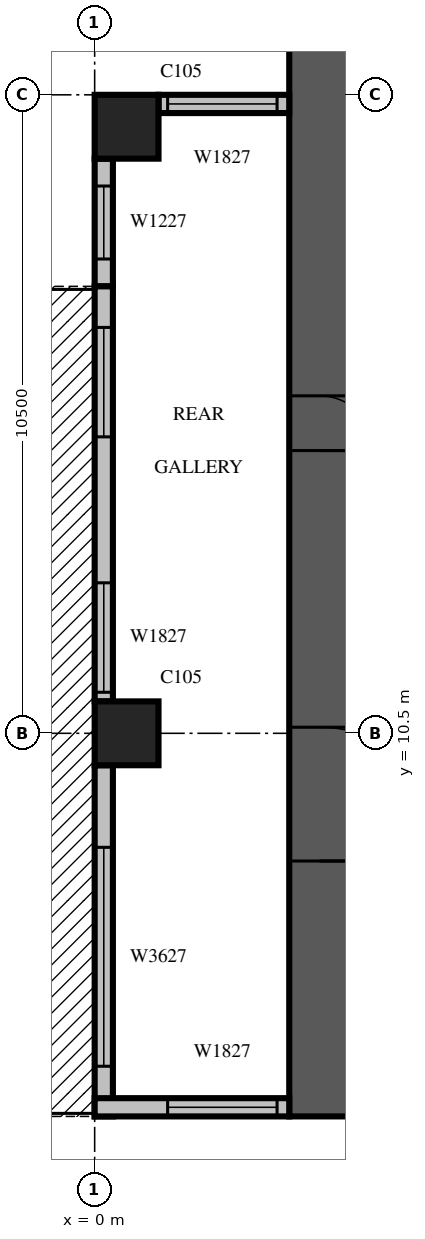
"""IFC4 building model, lengths in metres.
Left out: names, types, materials, properties, quantities, classifications, styles, units other than length and angle.
Written with IfcOpenShell. Run it as: python <this file> out.ifc"""

import sys

from ifc_helpers import new_model, si_unit, direction, frame, frame_2d, origin, origin_2d, place, context, subcontext, project, spatial, rectangle, extrude, source, transform, mapped, element, fill, save


model = new_model("IFC4")
c1 = context("Model", 3, precision=1e-05, world=origin(), true_north=direction((0.0, 1.0)))
c2 = subcontext(c1, "Body", "Model", "MODEL_VIEW")
j1 = project(units=[si_unit("LENGTHUNIT", "METRE"), si_unit("PLANEANGLEUNIT", "RADIAN")], contexts=[c1])
p1 = place(None, origin())
s1 = spatial("IfcSite", under=j1, at=p1, CompositionType="ELEMENT")
p2 = place(p1, origin())
s2 = spatial("IfcBuilding", under=s1, at=p2, CompositionType="ELEMENT")
p3 = place(p2, frame((0.0, 0.0, 145.5)))
s3 = spatial("IfcBuildingStorey", under=s2, at=p3, CompositionType="ELEMENT", Elevation=145.5)
m1 = source(origin(), c2, "Body", "SweptSolid", [
    extrude(rectangle(XDim=1.05, YDim=1.05, at=origin_2d()), origin(), (0.0, 0.0, 1.0), 4.2),
])
for number, where, z_axis, x_axis in (
    (1, (0.525, 10.5, 0.0), (0.0, 0.0, 1.0), (1.0, 0.0, 0.0)),
    (2, (0.525, 20.475, 0.0), (0.0, 0.0, 1.0), (1.0, 0.0, 0.0)),
):
    element("IfcColumn", number, at=place(p3, frame(where, z_axis=z_axis, x_axis=x_axis)), inside=s3, PredefinedType="COLUMN", context=c2, shape_type="MappedRepresentation", body=[
        mapped(m1, transform((0.0, 0.0, 0.0), scale=1.0)),
    ])
m2 = source(origin(), c2, "Body", "SweptSolid", [
    extrude(rectangle(XDim=17.8, YDim=1.0, at=frame_2d((8.9, 0.0))), origin(), (0.0, 0.0, 1.0), 4.2),
])
p4 = place(p3, frame((3.7, 4.2, 0.0), z_axis=(0.0, 0.0, 1.0), x_axis=(0.0, 1.0, 0.0)))
e3 = element("IfcWall", 3, at=p4, inside=s3, PredefinedType="SHEAR", context=c2, shape_type="MappedRepresentation", body=[
    mapped(m2, transform((0.0, 0.0, 0.0), scale=1.0)),
])
m3 = source(origin(), c2, "Body", "SweptSolid", [
    extrude(rectangle(XDim=2.2, YDim=2.1, at=frame_2d((1.1, 1.05))), frame((0.0, 0.51, 0.0), z_axis=(0.0, -1.0, 0.0), x_axis=(1.0, 0.0, 0.0)), (0.0, 0.0, 1.0), 1.02),
])
p5 = place(p4, frame((4.2, 0.0, 0.0)))
e4 = element("IfcOpeningElement", 4, at=p5, cuts=e3, PredefinedType="OPENING", context=c2, shape_type="MappedRepresentation", body=[
    mapped(m3, transform((0.0, 0.0, 0.0), scale=1.0)),
])
m4 = source(origin(), c2, "Body", "SweptSolid", [
    extrude(rectangle(XDim=0.9, YDim=2.1, at=frame_2d((0.45, 1.05))), frame((0.0, 0.51, 0.0), z_axis=(0.0, -1.0, 0.0), x_axis=(1.0, 0.0, 0.0)), (0.0, 0.0, 1.0), 1.02),
])
p6 = place(p4, frame((10.95, 0.0, 0.0)))
e5 = element("IfcOpeningElement", 5, at=p6, cuts=e3, PredefinedType="OPENING", context=c2, shape_type="MappedRepresentation", body=[
    mapped(m4, transform((0.0, 0.0, 0.0), scale=1.0)),
])
m5 = source(origin(), c2, "Body", "SweptSolid", [
    extrude(rectangle(XDim=2.15, YDim=0.3, at=frame_2d((1.075, 0.0))), origin(), (0.0, 0.0, 1.0), 3.8),
])
p7 = place(p3, frame((3.2, 20.85, 0.0), z_axis=(0.0, 0.0, 1.0), x_axis=(-1.0, 0.0, 0.0)))
e6 = element("IfcWall", 6, at=p7, inside=s3, PredefinedType="STANDARD", context=c2, shape_type="MappedRepresentation", body=[
    mapped(m5, transform((0.0, 0.0, 0.0), scale=1.0)),
])
m6 = source(origin(), c2, "Body", "SweptSolid", [
    extrude(rectangle(XDim=1.8, YDim=2.7, at=frame_2d((0.9, 1.35))), frame((0.0, 0.16, 0.0), z_axis=(0.0, -1.0, 0.0), x_axis=(1.0, 0.0, 0.0)), (0.0, 0.0, 1.0), 0.32),
])
p8 = place(p7, frame((0.2, 0.0, 0.6)))
e7 = element("IfcOpeningElement", 7, at=p8, cuts=e6, PredefinedType="OPENING", context=c2, shape_type="MappedRepresentation", body=[
    mapped(m6, transform((0.0, 0.0, 0.0), scale=1.0)),
])
m7 = source(origin(), c2, "Body", "SweptSolid", [
    extrude(rectangle(XDim=2.1, YDim=0.3, at=frame_2d((1.05, 0.0))), origin(), (0.0, 0.0, 1.0), 3.8),
])
p9 = place(p3, frame((0.15, 19.95, 0.0), z_axis=(0.0, 0.0, 1.0), x_axis=(0.0, -1.0, 0.0)))
e8 = element("IfcWall", 8, at=p9, inside=s3, PredefinedType="STANDARD", context=c2, shape_type="MappedRepresentation", body=[
    mapped(m7, transform((0.0, 0.0, 0.0), scale=1.0)),
])
m8 = source(origin(), c2, "Body", "SweptSolid", [
    extrude(rectangle(XDim=1.2, YDim=2.7, at=frame_2d((0.6, 1.35))), frame((0.0, 0.16, 0.0), z_axis=(0.0, -1.0, 0.0), x_axis=(1.0, 0.0, 0.0)), (0.0, 0.0, 1.0), 0.32),
])
p10 = place(p9, frame((0.45, 0.0, 0.6)))
e9 = element("IfcOpeningElement", 9, at=p10, cuts=e8, PredefinedType="OPENING", context=c2, shape_type="MappedRepresentation", body=[
    mapped(m8, transform((0.0, 0.0, 0.0), scale=1.0)),
])
m9 = source(origin(), c2, "Body", "SweptSolid", [
    extrude(rectangle(XDim=6.825, YDim=0.3, at=frame_2d((3.413, 0.0))), origin(), (0.0, 0.0, 1.0), 3.8),
])
p11 = place(p3, frame((0.15, 17.85, 0.0), z_axis=(0.0, 0.0, 1.0), x_axis=(0.0, -1.0, 0.0)))
e10 = element("IfcWall", 10, at=p11, inside=s3, PredefinedType="STANDARD", context=c2, shape_type="MappedRepresentation", body=[
    mapped(m9, transform((0.0, 0.0, 0.0), scale=1.0)),
])
m10 = source(origin(), c2, "Body", "SweptSolid", [
    extrude(rectangle(XDim=1.8, YDim=2.4, at=frame_2d((0.9, 1.2))), frame((0.0, 0.16, 0.0), z_axis=(0.0, -1.0, 0.0), x_axis=(1.0, 0.0, 0.0)), (0.0, 0.0, 1.0), 0.32),
])
p12 = place(p11, frame((0.675, 0.0, 0.0)))
e11 = element("IfcOpeningElement", 11, at=p12, cuts=e10, PredefinedType="OPENING", context=c2, shape_type="MappedRepresentation", body=[
    mapped(m10, transform((0.0, 0.0, 0.0), scale=1.0)),
])
p13 = place(p11, frame((4.875, 0.0, 0.6)))
e12 = element("IfcOpeningElement", 12, at=p13, cuts=e10, PredefinedType="OPENING", context=c2, shape_type="MappedRepresentation", body=[
    mapped(m6, transform((0.0, 0.0, 0.0), scale=1.0)),
])
m11 = source(origin(), c2, "Body", "SweptSolid", [
    extrude(rectangle(XDim=5.775, YDim=0.3, at=frame_2d((2.888, 0.0))), origin(), (0.0, 0.0, 1.0), 3.8),
])
p14 = place(p3, frame((0.15, 9.975, 0.0), z_axis=(0.0, 0.0, 1.0), x_axis=(0.0, -1.0, 0.0)))
e13 = element("IfcWall", 13, at=p14, inside=s3, PredefinedType="STANDARD", context=c2, shape_type="MappedRepresentation", body=[
    mapped(m11, transform((0.0, 0.0, 0.0), scale=1.0)),
])
m12 = source(origin(), c2, "Body", "SweptSolid", [
    extrude(rectangle(XDim=3.6, YDim=2.7, at=frame_2d((1.8, 1.35))), frame((0.0, 0.16, 0.0), z_axis=(0.0, -1.0, 0.0), x_axis=(1.0, 0.0, 0.0)), (0.0, 0.0, 1.0), 0.32),
])
p15 = place(p14, frame((1.35, 0.0, 0.6)))
e14 = element("IfcOpeningElement", 14, at=p15, cuts=e13, PredefinedType="OPENING", context=c2, shape_type="MappedRepresentation", body=[
    mapped(m12, transform((0.0, 0.0, 0.0), scale=1.0)),
])
m13 = source(origin(), c2, "Body", "SweptSolid", [
    extrude(rectangle(XDim=3.2, YDim=0.3, at=frame_2d((1.6, 0.0))), origin(), (0.0, 0.0, 1.0), 3.8),
])
p16 = place(p3, frame((0.0, 4.35, 0.0), z_axis=(0.0, 0.0, 1.0), x_axis=(1.0, 0.0, 0.0)))
e15 = element("IfcWall", 15, at=p16, inside=s3, PredefinedType="STANDARD", context=c2, shape_type="MappedRepresentation", body=[
    mapped(m13, transform((0.0, 0.0, 0.0), scale=1.0)),
])
p17 = place(p16, frame((1.2, 0.0, 0.6)))
e16 = element("IfcOpeningElement", 16, at=p17, cuts=e15, PredefinedType="OPENING", context=c2, shape_type="MappedRepresentation", body=[
    mapped(m6, transform((0.0, 0.0, 0.0), scale=1.0)),
])
m14 = source(origin(), c2, "Body", "SweptSolid", [
    extrude(rectangle(XDim=1.8, YDim=2.7, at=frame_2d((0.9, 1.35))), frame((0.0, 0.03, 0.0), z_axis=(0.0, -1.0, 0.0), x_axis=(1.0, 0.0, 0.0)), (0.0, 0.0, 1.0), 0.06),
])
p18 = place(p8, origin())
e17 = element("IfcWindow", 17, at=p18, inside=s3, PartitioningType="SINGLE_PANEL", PredefinedType="WINDOW", context=c2, shape_type="MappedRepresentation", body=[
    mapped(m14, transform((0.0, 0.0, 0.0), scale=1.0)),
])
fill(e7, e17)
m15 = source(origin(), c2, "Body", "SweptSolid", [
    extrude(rectangle(XDim=1.2, YDim=2.7, at=frame_2d((0.6, 1.35))), frame((0.0, 0.03, 0.0), z_axis=(0.0, -1.0, 0.0), x_axis=(1.0, 0.0, 0.0)), (0.0, 0.0, 1.0), 0.06),
])
p19 = place(p10, origin())
e18 = element("IfcWindow", 18, at=p19, inside=s3, PartitioningType="SINGLE_PANEL", PredefinedType="WINDOW", context=c2, shape_type="MappedRepresentation", body=[
    mapped(m15, transform((0.0, 0.0, 0.0), scale=1.0)),
])
fill(e9, e18)
m16 = source(origin(), c2, "Body", "SweptSolid", [
    extrude(rectangle(XDim=1.8, YDim=2.4, at=frame_2d((0.9, 1.2))), frame((0.0, 0.025, 0.0), z_axis=(0.0, -1.0, 0.0), x_axis=(1.0, 0.0, 0.0)), (0.0, 0.0, 1.0), 0.05),
])
p20 = place(p12, origin())
e19 = element("IfcDoor", 19, at=p20, inside=s3, OperationType="SLIDING_TO_LEFT", PredefinedType="DOOR", context=c2, shape_type="MappedRepresentation", body=[
    mapped(m16, transform((0.0, 0.0, 0.0), scale=1.0)),
])
fill(e11, e19)
p21 = place(p13, origin())
e20 = element("IfcWindow", 20, at=p21, inside=s3, PartitioningType="SINGLE_PANEL", PredefinedType="WINDOW", context=c2, shape_type="MappedRepresentation", body=[
    mapped(m14, transform((0.0, 0.0, 0.0), scale=1.0)),
])
fill(e12, e20)
m17 = source(origin(), c2, "Body", "SweptSolid", [
    extrude(rectangle(XDim=3.6, YDim=2.7, at=frame_2d((1.8, 1.35))), frame((0.0, 0.03, 0.0), z_axis=(0.0, -1.0, 0.0), x_axis=(1.0, 0.0, 0.0)), (0.0, 0.0, 1.0), 0.06),
])
p22 = place(p15, origin())
e21 = element("IfcWindow", 21, at=p22, inside=s3, PartitioningType="SINGLE_PANEL", PredefinedType="WINDOW", context=c2, shape_type="MappedRepresentation", body=[
    mapped(m17, transform((0.0, 0.0, 0.0), scale=1.0)),
])
fill(e14, e21)
p23 = place(p17, origin())
e22 = element("IfcWindow", 22, at=p23, inside=s3, PartitioningType="SINGLE_PANEL", PredefinedType="WINDOW", context=c2, shape_type="MappedRepresentation", body=[
    mapped(m14, transform((0.0, 0.0, 0.0), scale=1.0)),
])
fill(e16, e22)
m18 = source(origin(), c2, "Body", "SweptSolid", [
    extrude(rectangle(XDim=2.2, YDim=2.1, at=frame_2d((1.1, 1.05))), frame((0.0, 0.025, 0.0), z_axis=(0.0, -1.0, 0.0), x_axis=(1.0, 0.0, 0.0)), (0.0, 0.0, 1.0), 0.05),
])
p24 = place(p5, origin())
e23 = element("IfcDoor", 23, at=p24, inside=s3, OperationType="DOUBLE_DOOR_SINGLE_SWING", PredefinedType="DOOR", context=c2, shape_type="MappedRepresentation", body=[
    mapped(m18, transform((0.0, 0.0, 0.0), scale=1.0)),
])
fill(e4, e23)
m19 = source(origin(), c2, "Body", "SweptSolid", [
    extrude(rectangle(XDim=0.9, YDim=2.1, at=frame_2d((0.45, 1.05))), frame((0.0, 0.025, 0.0), z_axis=(0.0, -1.0, 0.0), x_axis=(1.0, 0.0, 0.0)), (0.0, 0.0, 1.0), 0.05),
])
p25 = place(p6, origin())
e24 = element("IfcDoor", 24, at=p25, inside=s3, OperationType="SINGLE_SWING_RIGHT", PredefinedType="DOOR", context=c2, shape_type="MappedRepresentation", body=[
    mapped(m19, transform((0.0, 0.0, 0.0), scale=1.0)),
])
fill(e5, e24)
save(model, sys.argv[1])
